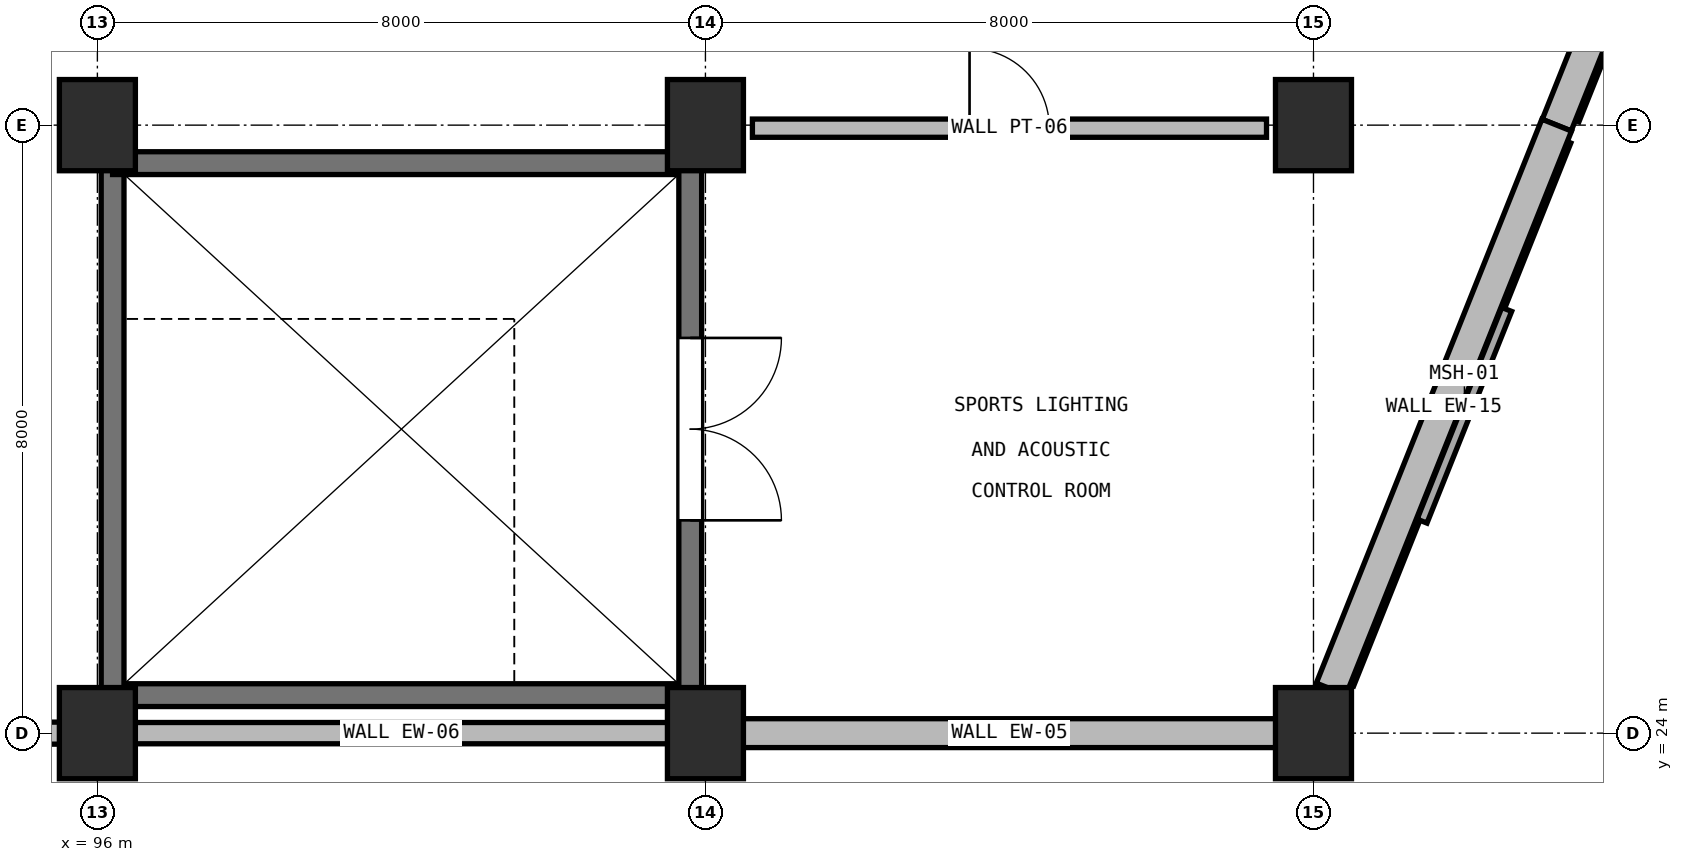
"""IFC4 building model, lengths in metres.
Left out: names, types, materials, properties, quantities, classifications, styles, units other than length and angle.
Written with IfcOpenShell. Run it as: python <this file> out.ifc"""

import sys

from ifc_helpers import new_model, si_unit, direction, frame, frame_2d, origin, origin_2d, place, context, subcontext, project, spatial, rectangle, extrude, element, fill, save


model = new_model("IFC4")
c1 = context("Model", 3, precision=1e-05, world=origin(), true_north=direction((0.0, 1.0)))
c2 = subcontext(c1, "Body", "Model", "MODEL_VIEW")
j1 = project(units=[si_unit("LENGTHUNIT", "METRE"), si_unit("PLANEANGLEUNIT", "RADIAN")], contexts=[c1])
p1 = place(None, origin())
s1 = spatial("IfcSite", under=j1, at=p1, CompositionType="ELEMENT")
p2 = place(p1, origin())
s2 = spatial("IfcBuilding", under=s1, at=p2, CompositionType="ELEMENT")
p3 = place(p2, frame((0.0, 0.0, 24.6)))
s3 = spatial("IfcBuildingStorey", under=s2, at=p3, CompositionType="ELEMENT", Elevation=24.6)
for number, where, z_axis, x_axis in (
    (1, (96.0, 24.0, 0.0), (0.0, 0.0, 1.0), (1.0, 0.0, 0.0)),
    (2, (96.0, 32.0, 0.0), (0.0, 0.0, 1.0), (1.0, 0.0, 0.0)),
    (3, (104.0, 24.0, 0.0), (0.0, 0.0, 1.0), (1.0, 0.0, 0.0)),
    (4, (104.0, 32.0, 0.0), (0.0, 0.0, 1.0), (1.0, 0.0, 0.0)),
    (5, (112.0, 24.0, 0.0), (0.0, 0.0, 1.0), (1.0, 0.0, 0.0)),
    (6, (112.0, 32.0, 0.0), (0.0, 0.0, 1.0), (1.0, 0.0, 0.0)),
):
    element("IfcColumn", number, at=place(p3, frame(where, z_axis=z_axis, x_axis=x_axis)), inside=s3, PredefinedType="COLUMN", context=c2, shape_type="SweptSolid", body=[
        extrude(rectangle(XDim=1.0, YDim=1.2, at=origin_2d()), origin(), (0.0, 0.0, 1.0), 4.8),
    ])
p4 = place(p3, frame((111.52, 24.0, 0.0), z_axis=(0.0, 0.0, 1.0), x_axis=(-1.0, 0.0, 0.0)))
e7 = element("IfcWall", 7, at=p4, inside=s3, PredefinedType="SOLIDWALL", context=c2, shape_type="SweptSolid", body=[
    extrude(rectangle(XDim=7.04, YDim=0.38, at=frame_2d((3.52, 0.0))), origin(), (0.0, 0.0, 1.0), 3.71),
])
p5 = place(p3, frame((103.52, 24.0, 0.0), z_axis=(0.0, 0.0, 1.0), x_axis=(-1.0, 0.0, 0.0)))
e8 = element("IfcWall", 8, at=p5, inside=s3, PredefinedType="SOLIDWALL", context=c2, shape_type="SweptSolid", body=[
    extrude(rectangle(XDim=7.04, YDim=0.28, at=frame_2d((3.52, 0.0))), origin(), (0.0, 0.0, 1.0), 3.71),
])
p6 = place(p3, frame((95.52, 24.0, 0.0), z_axis=(0.0, 0.0, 1.0), x_axis=(-1.0, 0.0, 0.0)))
e9 = element("IfcWall", 9, at=p6, inside=s3, PredefinedType="SOLIDWALL", context=c2, shape_type="SweptSolid", body=[
    extrude(rectangle(XDim=7.04, YDim=0.29, at=frame_2d((3.52, 0.0))), origin(), (0.0, 0.0, 1.0), 3.71),
])
p7 = place(p3, frame((118.4, 40.0, 0.0), z_axis=(0.0, 0.0, 1.0), x_axis=(-0.371385791018, -0.928478645005, 0.0)))
e10 = element("IfcWall", 10, at=p7, inside=s3, PredefinedType="SOLIDWALL", context=c2, shape_type="SweptSolid", body=[
    extrude(rectangle(XDim=8.616, YDim=0.41, at=frame_2d((4.308, 0.0))), origin(), (0.0, 0.0, 1.0), 2.86),
])
p8 = place(p3, frame((115.2, 32.0, 0.0), z_axis=(0.0, 0.0, 1.0), x_axis=(-0.371395943584, -0.928474583976, 0.0)))
e11 = element("IfcWall", 11, at=p8, inside=s3, PredefinedType="SOLIDWALL", context=c2, shape_type="SweptSolid", body=[
    extrude(rectangle(XDim=7.991, YDim=0.42, at=frame_2d((3.996, 0.0))), origin(), (0.0, 0.0, 1.0), 2.86),
])
p9 = place(p3, frame((103.8, 24.5, 0.0), z_axis=(0.0, 0.0, 1.0), x_axis=(-1.0, 0.0, 0.0)))
e12 = element("IfcWall", 12, at=p9, inside=s3, PredefinedType="SHEAR", context=c2, shape_type="SweptSolid", body=[
    extrude(rectangle(XDim=7.6, YDim=0.3, at=frame_2d((3.8, 0.0))), origin(), (0.0, 0.0, 1.0), 4.55),
])
p10 = place(p3, frame((96.2, 24.5, 0.0), z_axis=(0.0, 0.0, 1.0), x_axis=(0.0, 1.0, 0.0)))
e13 = element("IfcWall", 13, at=p10, inside=s3, PredefinedType="SHEAR", context=c2, shape_type="SweptSolid", body=[
    extrude(rectangle(XDim=7.0, YDim=0.3, at=frame_2d((3.5, 0.0))), origin(), (0.0, 0.0, 1.0), 4.55),
])
p11 = place(p3, frame((96.2, 31.5, 0.0), z_axis=(0.0, 0.0, 1.0), x_axis=(1.0, 0.0, 0.0)))
e14 = element("IfcWall", 14, at=p11, inside=s3, PredefinedType="SHEAR", context=c2, shape_type="SweptSolid", body=[
    extrude(rectangle(XDim=7.6, YDim=0.3, at=frame_2d((3.8, 0.0))), origin(), (0.0, 0.0, 1.0), 4.55),
])
p12 = place(p3, frame((103.8, 31.5, 0.0), z_axis=(0.0, 0.0, 1.0), x_axis=(0.0, -1.0, 0.0)))
e15 = element("IfcWall", 15, at=p12, inside=s3, PredefinedType="SHEAR", context=c2, shape_type="SweptSolid", body=[
    extrude(rectangle(XDim=7.0, YDim=0.3, at=frame_2d((3.5, 0.0))), origin(), (0.0, 0.0, 1.0), 4.55),
])
p13 = place(p12, frame((2.3, 0.0, 0.0)))
e16 = element("IfcOpeningElement", 16, at=p13, cuts=e15, PredefinedType="OPENING", context=c2, shape_type="SweptSolid", body=[
    extrude(rectangle(XDim=2.4, YDim=2.2, at=frame_2d((1.2, 1.1))), frame((0.0, 0.16, 0.0), z_axis=(0.0, -1.0, 0.0), x_axis=(1.0, 0.0, 0.0)), (0.0, 0.0, 1.0), 0.32),
])
p14 = place(p3, frame((104.618, 31.96, 0.0), z_axis=(0.0, 0.0, 1.0), x_axis=(1.0, 0.0, 0.0)))
e17 = element("IfcWall", 17, at=p14, inside=s3, PredefinedType="STANDARD", context=c2, shape_type="SweptSolid", body=[
    extrude(rectangle(XDim=6.764, YDim=0.24, at=frame_2d((3.382, 0.0))), origin(), (0.0, 0.0, 1.0), 3.71),
])
p15 = place(p14, frame((2.857, 0.0, 0.0)))
e18 = element("IfcOpeningElement", 18, at=p15, cuts=e17, PredefinedType="OPENING", context=c2, shape_type="SweptSolid", body=[
    extrude(rectangle(XDim=1.05, YDim=2.15, at=frame_2d((0.525, 1.075))), frame((0.0, 0.13, 0.0), z_axis=(0.0, -1.0, 0.0), x_axis=(1.0, 0.0, 0.0)), (0.0, 0.0, 1.0), 0.26),
])
p16 = place(p13, frame((2.4, 0.0, 0.0), z_axis=(0.0, 0.0, 1.0), x_axis=(-1.0, 0.0, 0.0)))
e19 = element("IfcDoor", 19, at=p16, inside=s3, OperationType="DOUBLE_DOOR_SINGLE_SWING", PredefinedType="DOOR", context=c2, shape_type="SweptSolid", body=[
    extrude(rectangle(XDim=2.4, YDim=2.2, at=frame_2d((1.2, 1.1))), frame((0.0, 0.025, 0.0), z_axis=(0.0, -1.0, 0.0), x_axis=(1.0, 0.0, 0.0)), (0.0, 0.0, 1.0), 0.05),
])
fill(e16, e19)
p17 = place(p15, origin())
e20 = element("IfcDoor", 20, at=p17, inside=s3, OperationType="SINGLE_SWING_LEFT", PredefinedType="DOOR", context=c2, shape_type="SweptSolid", body=[
    extrude(rectangle(XDim=1.05, YDim=2.15, at=frame_2d((0.525, 1.075))), frame((0.0, 0.025, 0.0), z_axis=(0.0, -1.0, 0.0), x_axis=(1.0, 0.0, 0.0)), (0.0, 0.0, 1.0), 0.05),
])
fill(e18, e20)
save(model, sys.argv[1])
